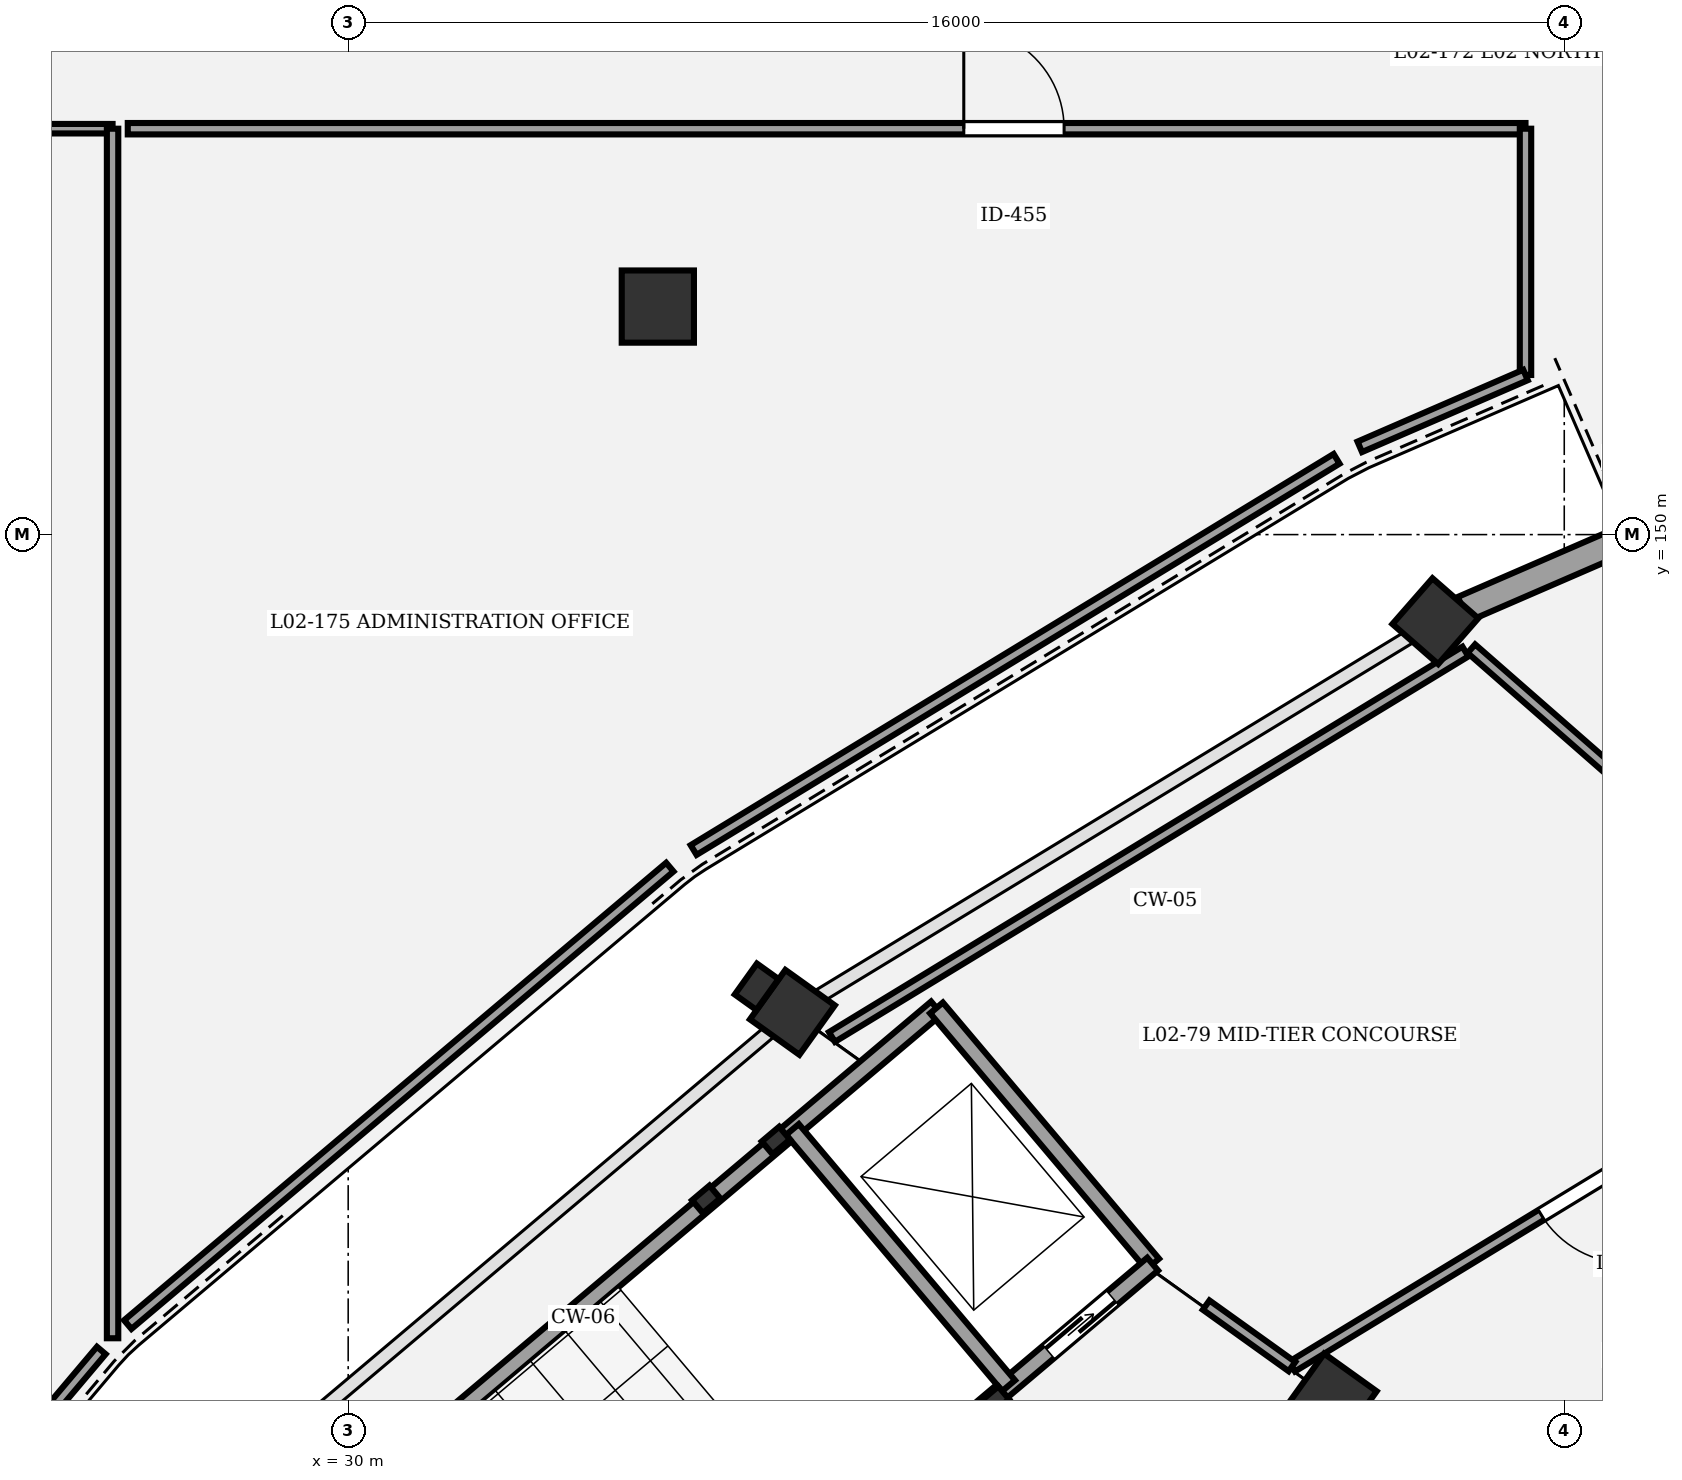
"""IFC4 building model, lengths in metres.
Left out: names, types, materials, properties, quantities, classifications, styles, units other than length and angle.
Written with IfcOpenShell. Run it as: python <this file> out.ifc"""

import sys

from ifc_helpers import new_model, si_unit, direction, frame, frame_2d, origin, origin_2d, place, context, subcontext, project, spatial, rectangle, circle, extrude, element, fill, save


model = new_model("IFC4")
c1 = context("Model", 3, precision=1e-05, world=origin(), true_north=direction((0.0, 1.0)))
c2 = subcontext(c1, "Body", "Model", "MODEL_VIEW")
j1 = project(units=[si_unit("LENGTHUNIT", "METRE"), si_unit("PLANEANGLEUNIT", "RADIAN")], contexts=[c1])
p1 = place(None, origin())
s1 = spatial("IfcSite", under=j1, at=p1, CompositionType="ELEMENT")
p2 = place(p1, origin())
s2 = spatial("IfcBuilding", under=s1, at=p2, CompositionType="ELEMENT")
p3 = place(p2, frame((0.0, 0.0, 10.2)))
s3 = spatial("IfcBuildingStorey", under=s2, at=p3, CompositionType="ELEMENT", Elevation=10.2)
p4 = place(p3, frame((44.304, 148.861, 0.0), z_axis=(0.0, 0.0, 1.0), x_axis=(-0.752529860433, 0.658558128912, 0.0)))
e1 = element("IfcColumn", 1, at=p4, inside=s3, PredefinedType="COLUMN", context=c2, shape_type="SweptSolid", body=[
    extrude(rectangle(XDim=0.8, YDim=0.8, at=origin_2d()), origin(), (0.0, 0.0, 1.0), 4.5),
])
p5 = place(p3, frame((42.939, 138.632, 0.0), z_axis=(0.0, 0.0, 1.0), x_axis=(-0.812897512265, 0.582406760395, 0.0)))
e2 = element("IfcColumn", 2, at=p5, inside=s3, PredefinedType="COLUMN", context=c2, shape_type="SweptSolid", body=[
    extrude(rectangle(XDim=0.85, YDim=0.85, at=origin_2d()), origin(), (0.0, 0.0, 1.0), 4.5),
])
p6 = place(p3, frame((35.844, 143.715, 0.0), z_axis=(0.0, 0.0, 1.0), x_axis=(-0.812897512265, 0.582406760395, 0.0)))
e3 = element("IfcColumn", 3, at=p6, inside=s3, PredefinedType="COLUMN", context=c2, shape_type="SweptSolid", body=[
    extrude(rectangle(XDim=0.8, YDim=0.8, at=origin_2d()), origin(), (0.0, 0.0, 1.0), 4.5),
])
p7 = place(p3, frame((35.375, 144.051, 0.0), z_axis=(0.0, 0.0, 1.0), x_axis=(-0.582406760395, -0.812897512265, 0.0)))
e4 = element("IfcColumn", 4, at=p7, inside=s3, PredefinedType="PILASTER", context=c2, shape_type="SweptSolid", body=[
    extrude(rectangle(XDim=0.5, YDim=0.35, at=origin_2d()), origin(), (0.0, 0.0, 1.0), 4.5),
])
p8 = place(p3, frame((34.074, 153.0, 0.0), z_axis=(0.0, 0.0, 1.0), x_axis=(1.0, 0.0, 0.0)))
e5 = element("IfcColumn", 5, at=p8, inside=s3, PredefinedType="COLUMN", context=c2, shape_type="SweptSolid", body=[
    extrude(circle(Radius=0.475, at=origin_2d()), origin(), (0.0, 0.0, 1.0), 4.5),
])
p9 = place(p3, frame((44.669, 149.019, 0.0), z_axis=(0.0, 0.0, 1.0), x_axis=(0.917498288986, 0.397739726088, 0.0)))
e6 = element("IfcWall", 6, at=p9, inside=s3, PredefinedType="STANDARD", context=c2, shape_type="SweptSolid", body=[
    extrude(rectangle(XDim=9.84, YDim=0.35, at=frame_2d((4.92, 0.0))), origin(), (0.0, 0.0, 1.0), 3.42),
])
p10 = place(p9, frame((4.02, 0.0, 0.0)))
e7 = element("IfcOpeningElement", 7, at=p10, cuts=e6, PredefinedType="OPENING", context=c2, shape_type="SweptSolid", body=[
    extrude(rectangle(XDim=1.8, YDim=2.4, at=frame_2d((0.9, 1.2))), frame((0.0, 0.185, 0.0), z_axis=(0.0, -1.0, 0.0), x_axis=(1.0, 0.0, 0.0)), (0.0, 0.0, 1.0), 0.37),
])
for number, where, z_axis, x_axis in (
    (8, (38.51, 138.613, 0.0), (0.0, 0.0, 1.0), (0.764, 0.645, 0.0)),
    (9, (35.627, 142.029, 0.0), (0.0, 0.0, 1.0), (0.764, 0.645, 0.0)),
    (10, (34.71, 141.255, 0.0), (0.0, 0.0, 1.0), (0.764, 0.645, 0.0)),
):
    element("IfcColumn", number, at=place(p3, frame(where, z_axis=z_axis, x_axis=x_axis)), inside=s3, PredefinedType="COLUMN", context=c2, shape_type="SweptSolid", body=[
        extrude(rectangle(XDim=0.3, YDim=0.22, at=origin_2d()), origin(), (0.0, 0.0, 1.0), 4.5),
    ])
p11 = place(p3, frame((29.319, 136.666, 0.0), z_axis=(0.0, 0.0, 1.0), x_axis=(0.764247804305, 0.644922703598, 0.0)))
e11 = element("IfcWall", 11, at=p11, inside=s3, PredefinedType="SHEAR", context=c2, shape_type="SweptSolid", body=[
    extrude(rectangle(XDim=11.02, YDim=0.22, at=frame_2d((5.51, 0.0))), origin(), (0.0, 0.0, 1.0), 4.25),
])
p12 = place(p3, frame((40.585, 140.403, 0.0), z_axis=(0.0, 0.0, 1.0), x_axis=(-0.644936622785, 0.764236058159, 0.0)))
e12 = element("IfcWall", 12, at=p12, inside=s3, PredefinedType="SHEAR", context=c2, shape_type="SweptSolid", body=[
    extrude(rectangle(XDim=4.41, YDim=0.22, at=frame_2d((2.205, 0.0))), origin(), (0.0, 0.0, 1.0), 4.25),
])
p13 = place(p3, frame((32.163, 133.296, 0.0), z_axis=(0.0, 0.0, 1.0), x_axis=(0.764257018762, 0.644911784102, 0.0)))
e13 = element("IfcWall", 13, at=p13, inside=s3, PredefinedType="SHEAR", context=c2, shape_type="SweptSolid", body=[
    extrude(rectangle(XDim=11.02, YDim=0.22, at=frame_2d((5.51, 0.0))), origin(), (0.0, 0.0, 1.0), 4.25),
])
p14 = place(p13, frame((0.3, 0.0, 0.0)))
e14 = element("IfcOpeningElement", 14, at=p14, cuts=e13, PredefinedType="OPENING", context=c2, shape_type="SweptSolid", body=[
    extrude(rectangle(XDim=1.15, YDim=2.15, at=frame_2d((0.575, 1.075))), frame((0.0, 0.12, 0.0), z_axis=(0.0, -1.0, 0.0), x_axis=(1.0, 0.0, 0.0)), (0.0, 0.0, 1.0), 0.24),
])
p15 = place(p13, frame((9.23, 0.0, 0.0)))
e15 = element("IfcOpeningElement", 15, at=p15, cuts=e13, PredefinedType="OPENING", context=c2, shape_type="SweptSolid", body=[
    extrude(rectangle(XDim=1.1, YDim=2.15, at=frame_2d((0.55, 1.075))), frame((0.0, 0.12, 0.0), z_axis=(0.0, -1.0, 0.0), x_axis=(1.0, 0.0, 0.0)), (0.0, 0.0, 1.0), 0.24),
])
p16 = place(p3, frame((38.689, 138.803, 0.0), z_axis=(0.0, 0.0, 1.0), x_axis=(-0.644904288042, 0.764263344185, 0.0)))
e16 = element("IfcWall", 16, at=p16, inside=s3, PredefinedType="SHEAR", context=c2, shape_type="SweptSolid", body=[
    extrude(rectangle(XDim=4.41, YDim=0.22, at=frame_2d((2.205, 0.0))), origin(), (0.0, 0.0, 1.0), 4.25),
])
p17 = place(p3, frame((50.105, 143.731, 0.0), z_axis=(0.0, 0.0, 1.0), x_axis=(-0.854321649351, -0.519744667554, 0.0)))
e17 = element("IfcWall", 17, at=p17, inside=s3, PredefinedType="PARTITIONING", context=c2, shape_type="SweptSolid", body=[
    extrude(rectangle(XDim=8.999, YDim=0.15, at=frame_2d((4.499, 0.0))), origin(), (0.0, 0.0, 1.0), 3.25),
])
p18 = place(p17, frame((3.839, 0.0, 0.0)))
e18 = element("IfcOpeningElement", 18, at=p18, cuts=e17, PredefinedType="OPENING", context=c2, shape_type="SweptSolid", body=[
    extrude(rectangle(XDim=1.32, YDim=2.1, at=frame_2d((0.66, 1.05))), frame((0.0, 0.085, 0.0), z_axis=(0.0, -1.0, 0.0), x_axis=(1.0, 0.0, 0.0)), (0.0, 0.0, 1.0), 0.17),
])
p19 = place(p3, frame((13.469, 155.343, 0.0), z_axis=(0.0, 0.0, 1.0), x_axis=(0.99999997621, -0.00021812629, 0.0)))
e19 = element("IfcWall", 19, at=p19, inside=s3, PredefinedType="PARTITIONING", context=c2, shape_type="SweptSolid", body=[
    extrude(rectangle(XDim=13.431, YDim=0.125, at=frame_2d((6.716, 0.0))), origin(), (0.0, 0.0, 1.0), 3.25),
])
p20 = place(p19, frame((7.841, 0.0, 0.0)))
e20 = element("IfcOpeningElement", 20, at=p20, cuts=e19, PredefinedType="OPENING", context=c2, shape_type="SweptSolid", body=[
    extrude(rectangle(XDim=1.22, YDim=2.2, at=frame_2d((0.61, 1.1))), frame((0.0, 0.073, 0.0), z_axis=(0.0, -1.0, 0.0), x_axis=(1.0, 0.0, 0.0)), (0.0, 0.0, 1.0), 0.145),
])
p21 = place(p3, frame((27.1, 155.34, 0.0), z_axis=(0.0, 0.0, 1.0), x_axis=(1.0, 0.0, 0.0)))
e21 = element("IfcWall", 21, at=p21, inside=s3, PredefinedType="PARTITIONING", context=c2, shape_type="SweptSolid", body=[
    extrude(rectangle(XDim=18.39, YDim=0.15, at=frame_2d((9.195, 0.0))), origin(), (0.0, 0.0, 1.0), 3.25),
])
p22 = place(p21, frame((11.0, 0.0, 0.0)))
e22 = element("IfcOpeningElement", 22, at=p22, cuts=e21, PredefinedType="OPENING", context=c2, shape_type="SweptSolid", body=[
    extrude(rectangle(XDim=1.32, YDim=2.2, at=frame_2d((0.66, 1.1))), frame((0.0, 0.085, 0.0), z_axis=(0.0, -1.0, 0.0), x_axis=(1.0, 0.0, 0.0)), (0.0, 0.0, 1.0), 0.17),
])
p23 = place(p3, frame((50.18, 143.772, 0.0), z_axis=(0.0, 0.0, 1.0), x_axis=(-0.752576694707, 0.658504607869, 0.0)))
e23 = element("IfcWall", 23, at=p23, inside=s3, PredefinedType="PARTITIONING", context=c2, shape_type="SweptSolid", body=[
    extrude(rectangle(XDim=7.178, YDim=0.15, at=frame_2d((3.589, 0.0))), origin(), (0.0, 0.0, 1.0), 3.25),
])
p24 = place(p3, frame((36.365, 143.391, 0.0), z_axis=(0.0, 0.0, 1.0), x_axis=(0.854323689683, 0.519741313777, 0.0)))
e24 = element("IfcWall", 24, at=p24, inside=s3, PredefinedType="PARTITIONING", context=c2, shape_type="SweptSolid", body=[
    extrude(rectangle(XDim=9.756, YDim=0.15, at=frame_2d((4.878, 0.0))), origin(), (0.0, 0.0, 1.0), 3.25),
])
p25 = place(p3, frame((42.418, 139.054, 0.0), z_axis=(0.0, 0.0, 1.0), x_axis=(-0.812925279681, 0.582368001916, 0.0)))
e25 = element("IfcWall", 25, at=p25, inside=s3, PredefinedType="PARTITIONING", context=c2, shape_type="SweptSolid", body=[
    extrude(rectangle(XDim=1.389, YDim=0.15, at=frame_2d((0.695, 0.0))), origin(), (0.0, 0.0, 1.0), 3.25),
])
p26 = place(p3, frame((26.9, 155.34, 0.0), z_axis=(0.0, 0.0, 1.0), x_axis=(0.0, -1.0, 0.0)))
e26 = element("IfcWall", 26, at=p26, inside=s3, PredefinedType="PARTITIONING", context=c2, shape_type="SweptSolid", body=[
    extrude(rectangle(XDim=15.913, YDim=0.15, at=frame_2d((7.957, 0.0))), origin(), (0.0, 0.0, 1.0), 3.25),
])
p27 = place(p3, frame((26.752, 139.266, 0.0), z_axis=(0.0, 0.0, 1.0), x_axis=(-0.645180125691, -0.764030500316, 0.0)))
e27 = element("IfcWall", 27, at=p27, inside=s3, PredefinedType="PARTITIONING", context=c2, shape_type="SweptSolid", body=[
    extrude(rectangle(XDim=9.151, YDim=0.15, at=frame_2d((4.576, 0.0))), origin(), (0.0, 0.0, 1.0), 3.25),
])
p28 = place(p3, frame((45.49, 155.34, 0.0), z_axis=(0.0, 0.0, 1.0), x_axis=(0.0, -1.0, 0.0)))
e28 = element("IfcWall", 28, at=p28, inside=s3, PredefinedType="PARTITIONING", context=c2, shape_type="SweptSolid", body=[
    extrude(rectangle(XDim=3.24, YDim=0.15, at=frame_2d((1.62, 0.0))), origin(), (0.0, 0.0, 1.0), 3.25),
])
p29 = place(p3, frame((45.49, 152.1, 0.0), z_axis=(0.0, 0.0, 1.0), x_axis=(-0.917484400903, -0.397771761314, 0.0)))
e29 = element("IfcWall", 29, at=p29, inside=s3, PredefinedType="PARTITIONING", context=c2, shape_type="SweptSolid", body=[
    extrude(rectangle(XDim=2.376, YDim=0.15, at=frame_2d((1.188, 0.0))), origin(), (0.0, 0.0, 1.0), 3.25),
])
p30 = place(p3, frame((43.004, 150.997, 0.0), z_axis=(0.0, 0.0, 1.0), x_axis=(-0.854333268174, -0.519725568826, 0.0)))
e30 = element("IfcWall", 30, at=p30, inside=s3, PredefinedType="PARTITIONING", context=c2, shape_type="SweptSolid", body=[
    extrude(rectangle(XDim=9.902, YDim=0.15, at=frame_2d((4.951, 0.0))), origin(), (0.0, 0.0, 1.0), 3.25),
])
p31 = place(p3, frame((34.232, 145.625, 0.0), z_axis=(0.0, 0.0, 1.0), x_axis=(-0.764245949545, -0.644924901523, 0.0)))
e31 = element("IfcWall", 31, at=p31, inside=s3, PredefinedType="PARTITIONING", context=c2, shape_type="SweptSolid", body=[
    extrude(rectangle(XDim=9.332, YDim=0.15, at=frame_2d((4.666, 0.0))), origin(), (0.0, 0.0, 1.0), 3.25),
])
p32 = place(p15, origin())
e32 = element("IfcDoor", 32, at=p32, inside=s3, OperationType="DOUBLE_DOOR_SLIDING", PredefinedType="DOOR", context=c2, shape_type="SweptSolid", body=[
    extrude(rectangle(XDim=1.1, YDim=2.15, at=frame_2d((0.55, 1.075))), frame((0.0, 0.025, 0.0), z_axis=(0.0, -1.0, 0.0), x_axis=(1.0, 0.0, 0.0)), (0.0, 0.0, 1.0), 0.05),
])
fill(e15, e32)
p33 = place(p18, origin())
e33 = element("IfcDoor", 33, at=p33, inside=s3, OperationType="SINGLE_SWING_LEFT", PredefinedType="DOOR", context=c2, shape_type="SweptSolid", body=[
    extrude(rectangle(XDim=1.32, YDim=2.1, at=frame_2d((0.66, 1.05))), frame((0.0, 0.025, 0.0), z_axis=(0.0, -1.0, 0.0), x_axis=(1.0, 0.0, 0.0)), (0.0, 0.0, 1.0), 0.05),
])
fill(e18, e33)
p34 = place(p22, origin())
e34 = element("IfcDoor", 34, at=p34, inside=s3, OperationType="SINGLE_SWING_LEFT", PredefinedType="DOOR", context=c2, shape_type="SweptSolid", body=[
    extrude(rectangle(XDim=1.32, YDim=2.2, at=frame_2d((0.66, 1.1))), frame((0.0, 0.025, 0.0), z_axis=(0.0, -1.0, 0.0), x_axis=(1.0, 0.0, 0.0)), (0.0, 0.0, 1.0), 0.05),
])
fill(e22, e34)
save(model, sys.argv[1])
